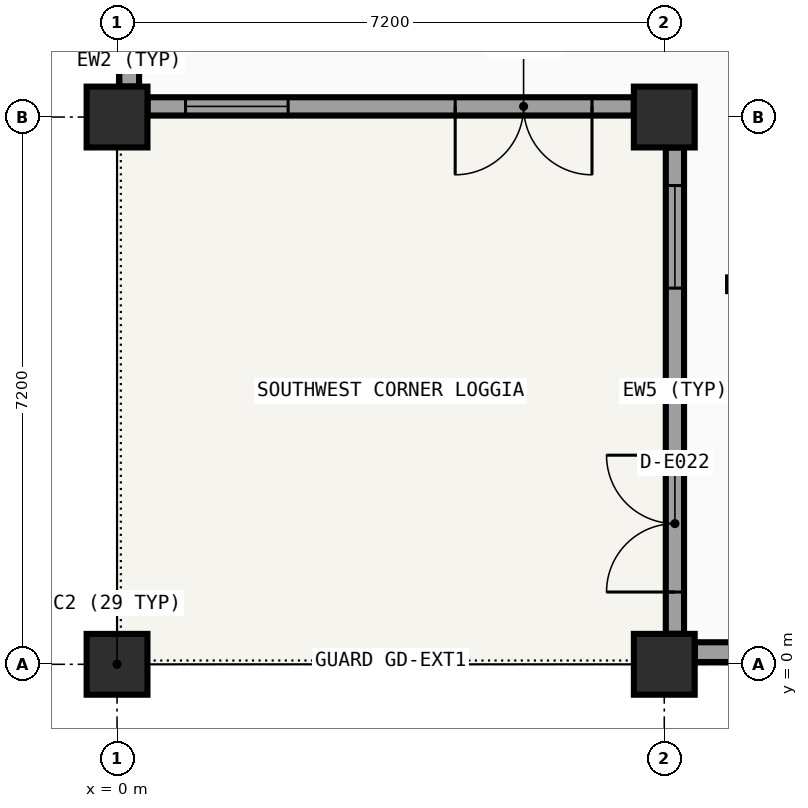
"""IFC4 building model, lengths in metres.
Left out: names, types, materials, properties, quantities, classifications, styles, units other than length and angle.
Written with IfcOpenShell. Run it as: python <this file> out.ifc"""

import sys

from ifc_helpers import new_model, si_unit, direction, frame, frame_2d, origin, origin_2d, place, context, subcontext, project, spatial, rectangle, extrude, element, fill, save


model = new_model("IFC4")
c1 = context("Model", 3, precision=1e-05, world=origin(), true_north=direction((0.0, 1.0)))
c2 = subcontext(c1, "Body", "Model", "MODEL_VIEW")
j1 = project(units=[si_unit("LENGTHUNIT", "METRE"), si_unit("PLANEANGLEUNIT", "RADIAN")], contexts=[c1])
p1 = place(None, origin())
s1 = spatial("IfcSite", under=j1, at=p1, CompositionType="ELEMENT")
p2 = place(p1, origin())
s2 = spatial("IfcBuilding", under=s1, at=p2, CompositionType="ELEMENT")
p3 = place(p2, frame((0.0, 0.0, 10.2)))
s3 = spatial("IfcBuildingStorey", under=s2, at=p3, CompositionType="ELEMENT", Elevation=10.2)
for number, where, z_axis, x_axis in (
    (1, (0.0, 0.0, 0.0), (0.0, 0.0, 1.0), (1.0, 0.0, 0.0)),
    (2, (0.0, 7.2, 0.0), (0.0, 0.0, 1.0), (1.0, 0.0, 0.0)),
    (3, (7.2, 0.0, 0.0), (0.0, 0.0, 1.0), (1.0, 0.0, 0.0)),
    (4, (7.2, 7.2, 0.0), (0.0, 0.0, 1.0), (1.0, 0.0, 0.0)),
):
    element("IfcColumn", number, at=place(p3, frame(where, z_axis=z_axis, x_axis=x_axis)), inside=s3, PredefinedType="COLUMN", context=c2, shape_type="SweptSolid", body=[
        extrude(rectangle(XDim=0.8, YDim=0.8, at=origin_2d()), origin(), (0.0, 0.0, 1.0), 4.5),
    ])
p4 = place(p3, frame((0.16, 7.601, 0.0), z_axis=(0.0, 0.0, 1.0), x_axis=(0.0, 1.0, 0.0)))
e5 = element("IfcWall", 5, at=p4, inside=s3, PredefinedType="SOLIDWALL", context=c2, shape_type="SweptSolid", body=[
    extrude(rectangle(XDim=0.68, YDim=0.26, at=frame_2d((0.34, 0.0))), origin(), (0.0, 0.0, 1.0), 3.696),
])
p5 = place(p3, frame((8.281, 0.16, 0.0), z_axis=(0.0, 0.0, 1.0), x_axis=(-1.0, 0.0, 0.0)))
e6 = element("IfcWall", 6, at=p5, inside=s3, PredefinedType="SOLIDWALL", context=c2, shape_type="SweptSolid", body=[
    extrude(rectangle(XDim=0.68, YDim=0.26, at=frame_2d((0.34, 0.0))), origin(), (0.0, 0.0, 1.0), 3.471),
])
p6 = place(p3, frame((7.34, 0.401, 0.0), z_axis=(0.0, 0.0, 1.0), x_axis=(0.0, 1.0, 0.0)))
e7 = element("IfcWall", 7, at=p6, inside=s3, PredefinedType="SOLIDWALL", context=c2, shape_type="SweptSolid", body=[
    extrude(rectangle(XDim=6.398, YDim=0.24, at=frame_2d((3.199, 0.0))), origin(), (0.0, 0.0, 1.0), 3.696),
])
p7 = place(p6, frame((0.55, 0.0, 0.0)))
e8 = element("IfcOpeningElement", 8, at=p7, cuts=e7, PredefinedType="OPENING", context=c2, shape_type="SweptSolid", body=[
    extrude(rectangle(XDim=1.8, YDim=2.15, at=frame_2d((0.9, 1.075))), frame((0.0, 0.13, 0.0), z_axis=(0.0, -1.0, 0.0), x_axis=(1.0, 0.0, 0.0)), (0.0, 0.0, 1.0), 0.26),
])
p8 = place(p6, frame((4.548, 0.0, 0.85)))
e9 = element("IfcOpeningElement", 9, at=p8, cuts=e7, PredefinedType="OPENING", context=c2, shape_type="SweptSolid", body=[
    extrude(rectangle(XDim=1.35, YDim=1.85, at=frame_2d((0.675, 0.925))), frame((0.0, 0.13, 0.0), z_axis=(0.0, -1.0, 0.0), x_axis=(1.0, 0.0, 0.0)), (0.0, 0.0, 1.0), 0.26),
])
p9 = place(p3, frame((6.799, 7.34, 0.0), z_axis=(0.0, 0.0, 1.0), x_axis=(-1.0, 0.0, 0.0)))
e10 = element("IfcWall", 10, at=p9, inside=s3, PredefinedType="SOLIDWALL", context=c2, shape_type="SweptSolid", body=[
    extrude(rectangle(XDim=6.398, YDim=0.24, at=frame_2d((3.199, 0.0))), origin(), (0.0, 0.0, 1.0), 3.471),
])
p10 = place(p9, frame((0.55, 0.0, 0.0)))
e11 = element("IfcOpeningElement", 11, at=p10, cuts=e10, PredefinedType="OPENING", context=c2, shape_type="SweptSolid", body=[
    extrude(rectangle(XDim=1.8, YDim=2.15, at=frame_2d((0.9, 1.075))), frame((0.0, 0.13, 0.0), z_axis=(0.0, -1.0, 0.0), x_axis=(1.0, 0.0, 0.0)), (0.0, 0.0, 1.0), 0.26),
])
p11 = place(p9, frame((4.548, 0.0, 0.85)))
e12 = element("IfcOpeningElement", 12, at=p11, cuts=e10, PredefinedType="OPENING", context=c2, shape_type="SweptSolid", body=[
    extrude(rectangle(XDim=1.35, YDim=1.85, at=frame_2d((0.675, 0.925))), frame((0.0, 0.13, 0.0), z_axis=(0.0, -1.0, 0.0), x_axis=(1.0, 0.0, 0.0)), (0.0, 0.0, 1.0), 0.26),
])
p12 = place(p3, frame((8.04, 5.0, 0.0), z_axis=(0.0, 0.0, 1.0), x_axis=(1.0, 0.0, 0.0)))
e13 = element("IfcWall", 13, at=p12, inside=s3, PredefinedType="PARTITIONING", context=c2, shape_type="SweptSolid", body=[
    extrude(rectangle(XDim=25.92, YDim=0.18, at=frame_2d((12.96, 0.0))), origin(), (0.0, 0.0, 1.0), 3.451),
])
p13 = place(p12, frame((9.45, 0.0, 0.0)))
e14 = element("IfcOpeningElement", 14, at=p13, cuts=e13, PredefinedType="OPENING", context=c2, shape_type="SweptSolid", body=[
    extrude(rectangle(XDim=1.0, YDim=2.1, at=frame_2d((0.5, 1.05))), frame((0.0, 0.1, 0.0), z_axis=(0.0, -1.0, 0.0), x_axis=(1.0, 0.0, 0.0)), (0.0, 0.0, 1.0), 0.2),
])
p14 = place(p7, origin())
e15 = element("IfcDoor", 15, at=p14, inside=s3, OperationType="DOUBLE_DOOR_SINGLE_SWING", PredefinedType="DOOR", context=c2, shape_type="SweptSolid", body=[
    extrude(rectangle(XDim=1.8, YDim=2.15, at=frame_2d((0.9, 1.075))), frame((0.0, 0.025, 0.0), z_axis=(0.0, -1.0, 0.0), x_axis=(1.0, 0.0, 0.0)), (0.0, 0.0, 1.0), 0.05),
])
fill(e8, e15)
p15 = place(p8, origin())
e16 = element("IfcWindow", 16, at=p15, inside=s3, PartitioningType="SINGLE_PANEL", PredefinedType="WINDOW", context=c2, shape_type="SweptSolid", body=[
    extrude(rectangle(XDim=1.35, YDim=1.85, at=frame_2d((0.675, 0.925))), frame((0.0, 0.03, 0.0), z_axis=(0.0, -1.0, 0.0), x_axis=(1.0, 0.0, 0.0)), (0.0, 0.0, 1.0), 0.06),
])
fill(e9, e16)
p16 = place(p10, origin())
e17 = element("IfcDoor", 17, at=p16, inside=s3, OperationType="DOUBLE_DOOR_SINGLE_SWING", PredefinedType="DOOR", context=c2, shape_type="SweptSolid", body=[
    extrude(rectangle(XDim=1.8, YDim=2.15, at=frame_2d((0.9, 1.075))), frame((0.0, 0.025, 0.0), z_axis=(0.0, -1.0, 0.0), x_axis=(1.0, 0.0, 0.0)), (0.0, 0.0, 1.0), 0.05),
])
fill(e11, e17)
p17 = place(p11, origin())
e18 = element("IfcWindow", 18, at=p17, inside=s3, PartitioningType="SINGLE_PANEL", PredefinedType="WINDOW", context=c2, shape_type="SweptSolid", body=[
    extrude(rectangle(XDim=1.35, YDim=1.85, at=frame_2d((0.675, 0.925))), frame((0.0, 0.03, 0.0), z_axis=(0.0, -1.0, 0.0), x_axis=(1.0, 0.0, 0.0)), (0.0, 0.0, 1.0), 0.06),
])
fill(e12, e18)
save(model, sys.argv[1])
